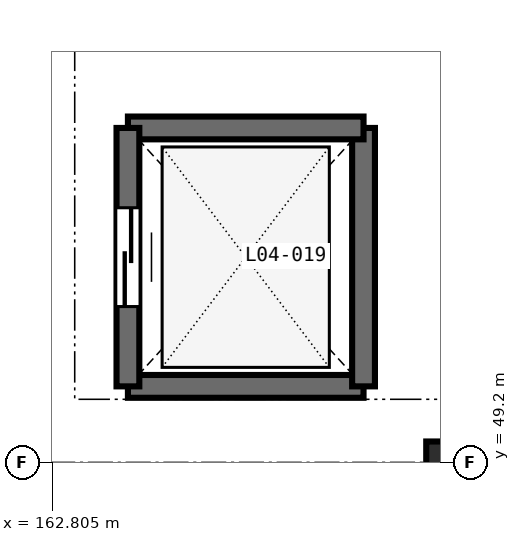
"""IFC4 building model, lengths in metres.
Left out: names, types, materials, properties, quantities, classifications, styles, units other than length and angle.
Written with IfcOpenShell. Run it as: python <this file> out.ifc"""

import sys

from ifc_helpers import new_model, si_unit, direction, frame, frame_2d, origin, origin_2d, place, context, subcontext, project, spatial, rectangle, extrude, element, fill, save


model = new_model("IFC4")
c1 = context("Model", 3, precision=1e-05, world=origin(), true_north=direction((0.0, 1.0)))
c2 = subcontext(c1, "Body", "Model", "MODEL_VIEW")
j1 = project(units=[si_unit("LENGTHUNIT", "METRE"), si_unit("PLANEANGLEUNIT", "RADIAN")], contexts=[c1])
p1 = place(None, origin())
s1 = spatial("IfcSite", under=j1, at=p1, CompositionType="ELEMENT")
p2 = place(p1, origin())
s2 = spatial("IfcBuilding", under=s1, at=p2, CompositionType="ELEMENT")
p3 = place(p2, frame((0.0, 0.0, 20.4)))
s3 = spatial("IfcBuildingStorey", under=s2, at=p3, CompositionType="ELEMENT", Elevation=20.4)
p4 = place(p3, frame((168.0, 49.2, 0.0), z_axis=(0.0, 0.0, 1.0), x_axis=(1.0, 0.0, 0.0)))
e1 = element("IfcColumn", 1, at=p4, inside=s3, PredefinedType="COLUMN", context=c2, shape_type="SweptSolid", body=[
    extrude(rectangle(XDim=0.55, YDim=0.55, at=origin_2d()), origin(), (0.0, 0.0, 1.0), 4.2),
])
p5 = place(p3, frame((163.8, 50.2, 0.0), z_axis=(0.0, 0.0, 1.0), x_axis=(1.0, 0.0, 0.0)))
e2 = element("IfcWall", 2, at=p5, inside=s3, PredefinedType="SHEAR", context=c2, shape_type="SweptSolid", body=[
    extrude(rectangle(XDim=3.1, YDim=0.3, at=frame_2d((1.55, 0.0))), origin(), (0.0, 0.0, 1.0), 4.2),
])
p6 = place(p3, frame((166.9, 50.2, 0.0), z_axis=(0.0, 0.0, 1.0), x_axis=(0.0, 1.0, 0.0)))
e3 = element("IfcWall", 3, at=p6, inside=s3, PredefinedType="SHEAR", context=c2, shape_type="SweptSolid", body=[
    extrude(rectangle(XDim=3.4, YDim=0.3, at=frame_2d((1.7, 0.0))), origin(), (0.0, 0.0, 1.0), 4.2),
])
p7 = place(p3, frame((166.9, 53.6, 0.0), z_axis=(0.0, 0.0, 1.0), x_axis=(-1.0, 0.0, 0.0)))
e4 = element("IfcWall", 4, at=p7, inside=s3, PredefinedType="SHEAR", context=c2, shape_type="SweptSolid", body=[
    extrude(rectangle(XDim=3.1, YDim=0.3, at=frame_2d((1.55, 0.0))), origin(), (0.0, 0.0, 1.0), 4.2),
])
p8 = place(p3, frame((163.8, 53.6, 0.0), z_axis=(0.0, 0.0, 1.0), x_axis=(0.0, -1.0, 0.0)))
e5 = element("IfcWall", 5, at=p8, inside=s3, PredefinedType="SHEAR", context=c2, shape_type="SweptSolid", body=[
    extrude(rectangle(XDim=3.4, YDim=0.3, at=frame_2d((1.7, 0.0))), origin(), (0.0, 0.0, 1.0), 4.2),
])
p9 = place(p8, frame((1.05, 0.0, 0.0)))
e6 = element("IfcOpeningElement", 6, at=p9, cuts=e5, PredefinedType="OPENING", context=c2, shape_type="SweptSolid", body=[
    extrude(rectangle(XDim=1.3, YDim=2.2, at=frame_2d((0.65, 1.1))), frame((0.0, 0.16, 0.0), z_axis=(0.0, -1.0, 0.0), x_axis=(1.0, 0.0, 0.0)), (0.0, 0.0, 1.0), 0.32),
])
p10 = place(p9, origin())
e7 = element("IfcDoor", 7, at=p10, inside=s3, OperationType="DOUBLE_DOOR_SLIDING", PredefinedType="DOOR", context=c2, shape_type="SweptSolid", body=[
    extrude(rectangle(XDim=1.3, YDim=2.2, at=frame_2d((0.65, 1.1))), frame((0.0, 0.025, 0.0), z_axis=(0.0, -1.0, 0.0), x_axis=(1.0, 0.0, 0.0)), (0.0, 0.0, 1.0), 0.05),
])
fill(e6, e7)
save(model, sys.argv[1])
